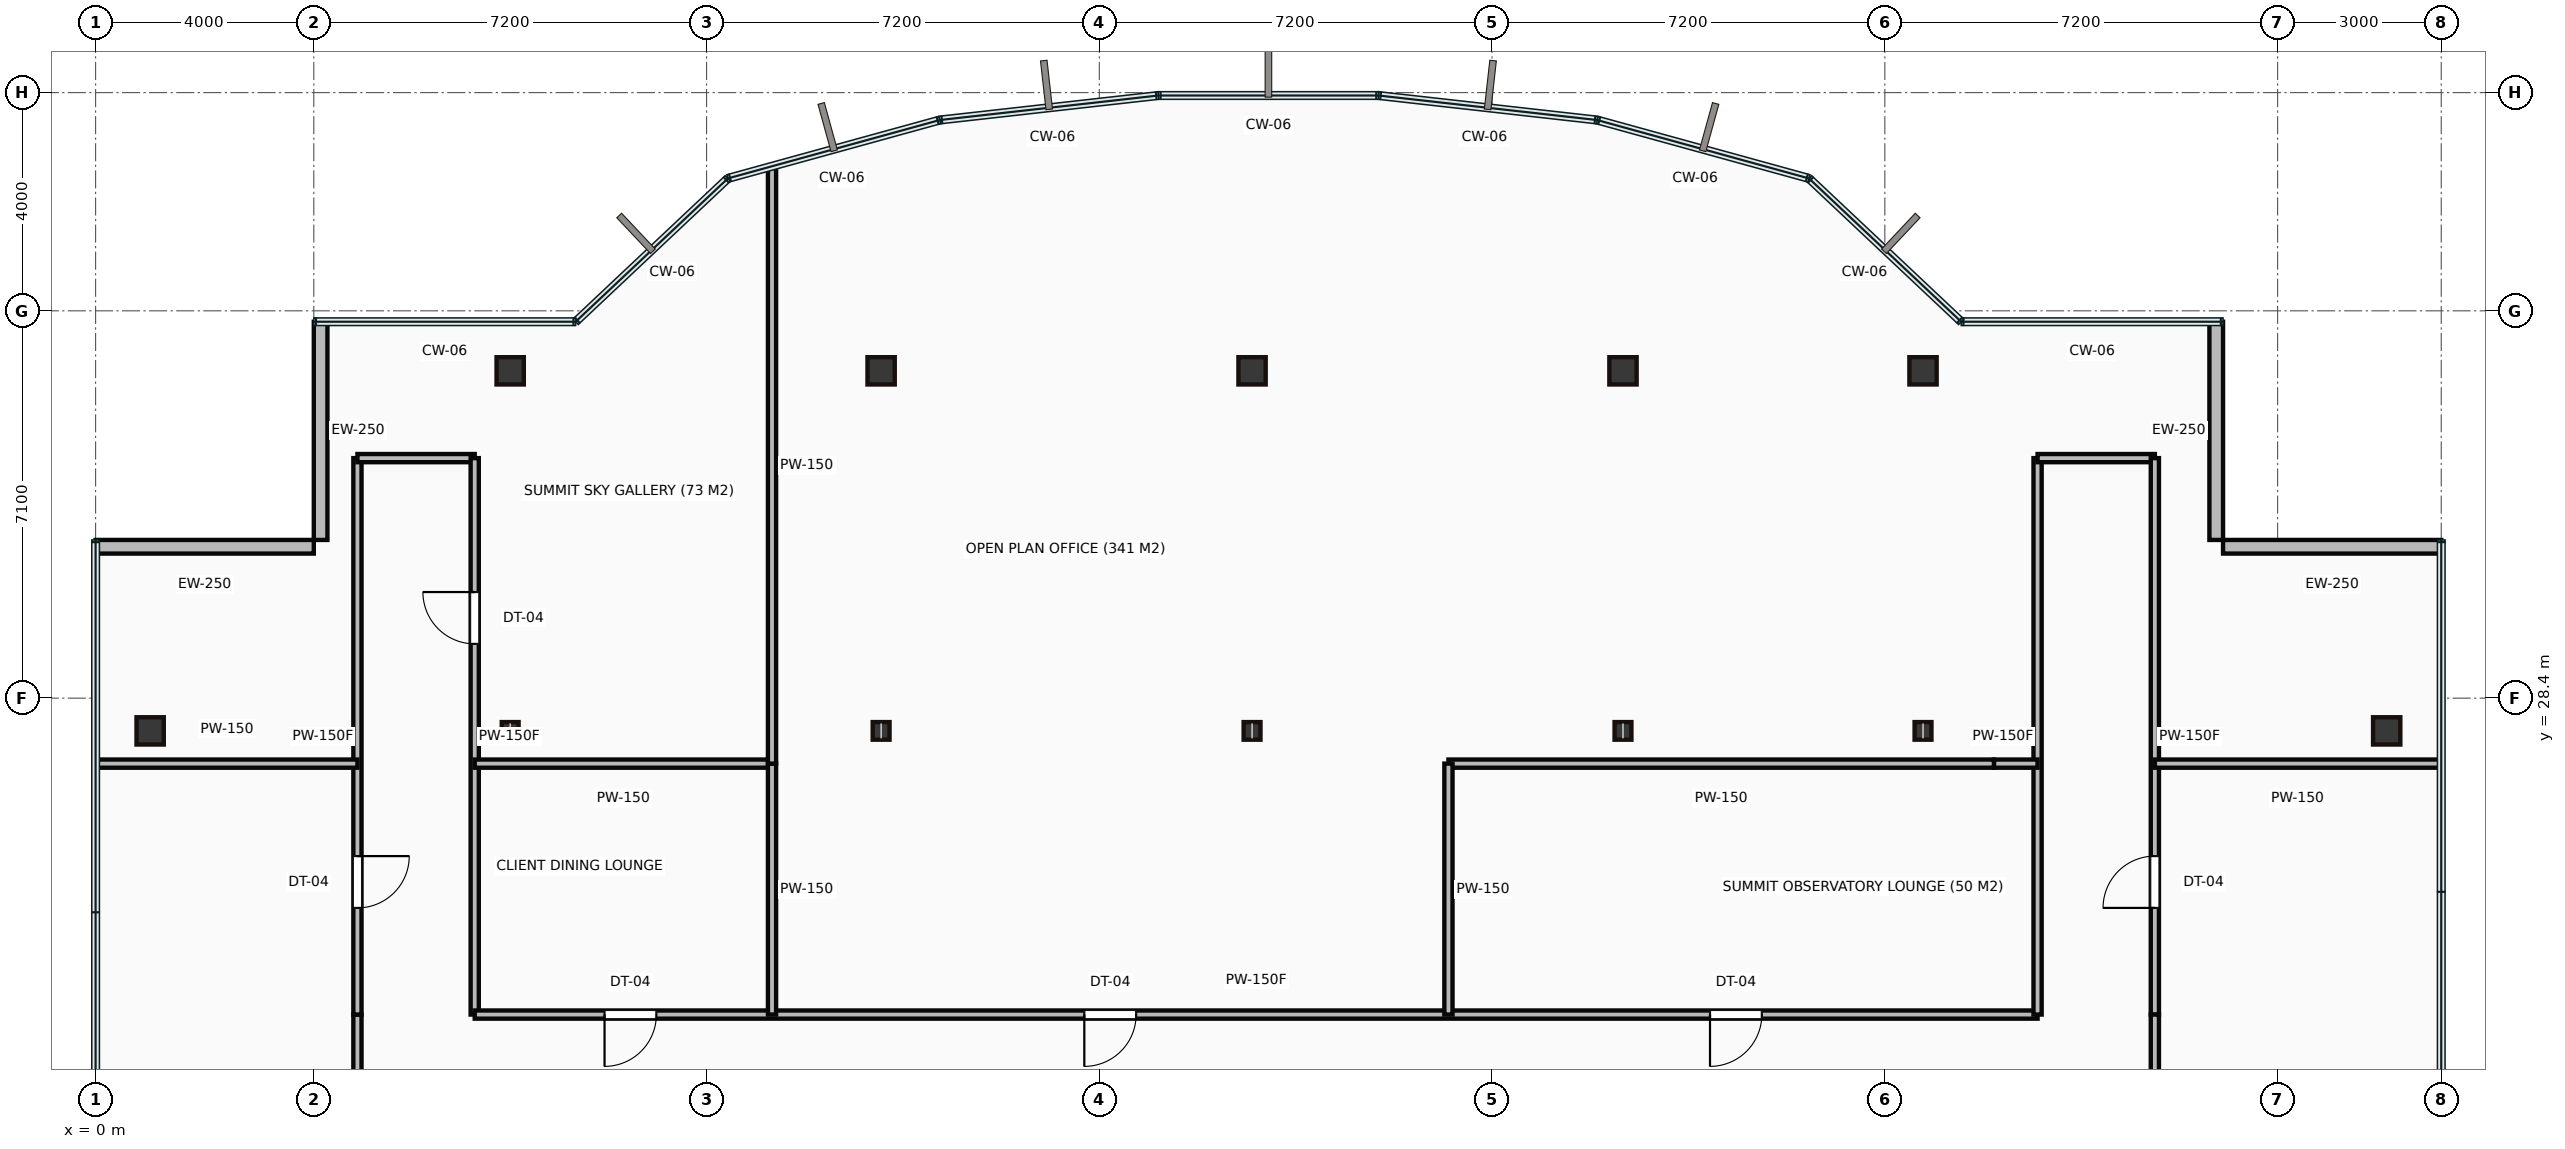
"""IFC4 building model, lengths in metres.
Left out: names, types, materials, properties, quantities, classifications, styles, units other than length and angle.
Written with IfcOpenShell. Run it as: python <this file> out.ifc"""

import sys

from ifc_helpers import new_model, si_unit, direction, frame, frame_2d, origin, origin_2d, place, context, subcontext, project, spatial, rectangle, hollow_rectangle, i_section, extrude, source, transform, mapped, element, fill, save


model = new_model("IFC4")
c1 = context("Model", 3, precision=1e-05, world=origin(), true_north=direction((0.0, 1.0)))
c2 = subcontext(c1, "Body", "Model", "MODEL_VIEW")
j1 = project(units=[si_unit("LENGTHUNIT", "METRE"), si_unit("PLANEANGLEUNIT", "RADIAN")], contexts=[c1])
p1 = place(None, origin())
s1 = spatial("IfcSite", under=j1, at=p1, CompositionType="ELEMENT")
p2 = place(p1, origin())
s2 = spatial("IfcBuilding", under=s1, at=p2, CompositionType="ELEMENT")
p3 = place(p2, frame((0.0, 0.0, 288.0)))
s3 = spatial("IfcBuildingStorey", under=s2, at=p3, CompositionType="ELEMENT", Elevation=288.0)
m1 = source(origin(), c2, "Body", "SweptSolid", [
    extrude(hollow_rectangle(XDim=0.5, YDim=0.5, WallThickness=0.022, at=origin_2d()), origin(), (0.0, 0.0, 1.0), 4.25),
])
p4 = place(p3, frame((1.0, 27.8, 0.0), z_axis=(0.0, 0.0, 1.0), x_axis=(1.0, 0.0, 0.0)))
e1 = element("IfcColumn", 1, at=p4, inside=s3, PredefinedType="COLUMN", context=c2, shape_type="MappedRepresentation", body=[
    mapped(m1, transform((0.0, 0.0, 0.0))),
])
m2 = source(origin(), c2, "Body", "SweptSolid", [
    extrude(i_section(OverallWidth=0.309, OverallDepth=0.323, WebThickness=0.014, FlangeThickness=0.023, at=origin_2d()), origin(), (0.0, 0.0, 1.0), 4.25),
])
p5 = place(p3, frame((7.6, 27.8, 0.0), z_axis=(0.0, 0.0, 1.0), x_axis=(1.0, 0.0, 0.0)))
e2 = element("IfcColumn", 2, at=p5, inside=s3, PredefinedType="COLUMN", context=c2, shape_type="MappedRepresentation", body=[
    mapped(m2, transform((0.0, 0.0, 0.0))),
])
p6 = place(p3, frame((7.6, 34.4, 0.0), z_axis=(0.0, 0.0, 1.0), x_axis=(1.0, 0.0, 0.0)))
e3 = element("IfcColumn", 3, at=p6, inside=s3, PredefinedType="COLUMN", context=c2, shape_type="MappedRepresentation", body=[
    mapped(m1, transform((0.0, 0.0, 0.0))),
])
p7 = place(p3, frame((14.4, 27.8, 0.0), z_axis=(0.0, 0.0, 1.0), x_axis=(1.0, 0.0, 0.0)))
e4 = element("IfcColumn", 4, at=p7, inside=s3, PredefinedType="COLUMN", context=c2, shape_type="MappedRepresentation", body=[
    mapped(m2, transform((0.0, 0.0, 0.0))),
])
p8 = place(p3, frame((14.4, 34.4, 0.0), z_axis=(0.0, 0.0, 1.0), x_axis=(1.0, 0.0, 0.0)))
e5 = element("IfcColumn", 5, at=p8, inside=s3, PredefinedType="COLUMN", context=c2, shape_type="MappedRepresentation", body=[
    mapped(m1, transform((0.0, 0.0, 0.0))),
])
p9 = place(p3, frame((21.2, 27.8, 0.0), z_axis=(0.0, 0.0, 1.0), x_axis=(1.0, 0.0, 0.0)))
e6 = element("IfcColumn", 6, at=p9, inside=s3, PredefinedType="COLUMN", context=c2, shape_type="MappedRepresentation", body=[
    mapped(m2, transform((0.0, 0.0, 0.0))),
])
p10 = place(p3, frame((21.2, 34.4, 0.0), z_axis=(0.0, 0.0, 1.0), x_axis=(1.0, 0.0, 0.0)))
e7 = element("IfcColumn", 7, at=p10, inside=s3, PredefinedType="COLUMN", context=c2, shape_type="MappedRepresentation", body=[
    mapped(m1, transform((0.0, 0.0, 0.0))),
])
p11 = place(p3, frame((28.0, 27.8, 0.0), z_axis=(0.0, 0.0, 1.0), x_axis=(1.0, 0.0, 0.0)))
e8 = element("IfcColumn", 8, at=p11, inside=s3, PredefinedType="COLUMN", context=c2, shape_type="MappedRepresentation", body=[
    mapped(m2, transform((0.0, 0.0, 0.0))),
])
p12 = place(p3, frame((28.0, 34.4, 0.0), z_axis=(0.0, 0.0, 1.0), x_axis=(1.0, 0.0, 0.0)))
e9 = element("IfcColumn", 9, at=p12, inside=s3, PredefinedType="COLUMN", context=c2, shape_type="MappedRepresentation", body=[
    mapped(m1, transform((0.0, 0.0, 0.0))),
])
p13 = place(p3, frame((33.5, 27.8, 0.0), z_axis=(0.0, 0.0, 1.0), x_axis=(1.0, 0.0, 0.0)))
e10 = element("IfcColumn", 10, at=p13, inside=s3, PredefinedType="COLUMN", context=c2, shape_type="MappedRepresentation", body=[
    mapped(m2, transform((0.0, 0.0, 0.0))),
])
for number, where, z_axis, x_axis in (
    (11, (33.5, 34.4, 0.0), (0.0, 0.0, 1.0), (1.0, 0.0, 0.0)),
    (12, (42.0, 27.8, 0.0), (0.0, 0.0, 1.0), (1.0, 0.0, 0.0)),
):
    element("IfcColumn", number, at=place(p3, frame(where, z_axis=z_axis, x_axis=x_axis)), inside=s3, PredefinedType="COLUMN", context=c2, shape_type="MappedRepresentation", body=[
        mapped(m1, transform((0.0, 0.0, 0.0))),
    ])
m3 = source(origin(), c2, "Body", "SweptSolid", [
    extrude(rectangle(XDim=4.0, YDim=0.25, at=frame_2d((2.0, 0.0))), origin(), (0.0, 0.0, 1.0), 3.85),
])
for number, where, z_axis, x_axis in (
    (13, (43.0, 31.175, 0.0), (0.0, 0.0, 1.0), (-1.0, 0.0, 0.0)),
    (14, (38.875, 31.3, 0.0), (0.0, 0.0, 1.0), (0.0, 1.0, 0.0)),
    (15, (4.125, 35.3, 0.0), (0.0, 0.0, 1.0), (0.0, -1.0, 0.0)),
    (16, (4.0, 31.175, 0.0), (0.0, 0.0, 1.0), (-1.0, 0.0, 0.0)),
):
    element("IfcWall", number, at=place(p3, frame(where, z_axis=z_axis, x_axis=x_axis)), inside=s3, PredefinedType="STANDARD", context=c2, shape_type="MappedRepresentation", body=[
        mapped(m3, transform((0.0, 0.0, 0.0))),
    ])
m4 = source(origin(), c2, "Body", "SweptSolid", [
    extrude(rectangle(XDim=2.0, YDim=0.15, at=frame_2d((1.0, 0.0))), origin(), (0.0, 0.0, 1.0), 3.85),
])
p14 = place(p3, frame((4.8, 20.6, 0.0), z_axis=(0.0, 0.0, 1.0), x_axis=(0.0, 1.0, 0.0)))
e17 = element("IfcWall", 17, at=p14, inside=s3, PredefinedType="PARTITIONING", context=c2, shape_type="MappedRepresentation", body=[
    mapped(m4, transform((0.0, 0.0, 0.0))),
])
m5 = source(origin(), c2, "Body", "SweptSolid", [
    extrude(rectangle(XDim=10.2, YDim=0.15, at=frame_2d((5.1, 0.0))), origin(), (0.0, 0.0, 1.0), 3.85),
])
p15 = place(p3, frame((4.8, 22.6, 0.0), z_axis=(0.0, 0.0, 1.0), x_axis=(0.0, 1.0, 0.0)))
e18 = element("IfcWall", 18, at=p15, inside=s3, PredefinedType="PARTITIONING", context=c2, shape_type="MappedRepresentation", body=[
    mapped(m5, transform((0.0, 0.0, 0.0))),
])
p16 = place(p15, frame((1.955, 0.0, 0.0)))
e19 = element("IfcOpeningElement", 19, at=p16, cuts=e18, PredefinedType="OPENING", context=c2, shape_type="SweptSolid", body=[
    extrude(rectangle(XDim=0.95, YDim=2.15, at=frame_2d((0.475, 1.075))), frame((0.0, 0.085, 0.0), z_axis=(0.0, -1.0, 0.0), x_axis=(1.0, 0.0, 0.0)), (0.0, 0.0, 1.0), 0.17),
])
m6 = source(origin(), c2, "Body", "SweptSolid", [
    extrude(rectangle(XDim=2.15, YDim=0.15, at=frame_2d((1.075, 0.0))), origin(), (0.0, 0.0, 1.0), 3.85),
])
p17 = place(p3, frame((4.8, 32.8, 0.0), z_axis=(0.0, 0.0, 1.0), x_axis=(1.0, 0.0, 0.0)))
e20 = element("IfcWall", 20, at=p17, inside=s3, PredefinedType="PARTITIONING", context=c2, shape_type="MappedRepresentation", body=[
    mapped(m6, transform((0.0, 0.0, 0.0))),
])
p18 = place(p3, frame((6.95, 32.8, 0.0), z_axis=(0.0, 0.0, 1.0), x_axis=(0.0, -1.0, 0.0)))
e21 = element("IfcWall", 21, at=p18, inside=s3, PredefinedType="PARTITIONING", context=c2, shape_type="MappedRepresentation", body=[
    mapped(m5, transform((0.0, 0.0, 0.0))),
])
p19 = place(p18, frame((2.455, 0.0, 0.0)))
e22 = element("IfcOpeningElement", 22, at=p19, cuts=e21, PredefinedType="OPENING", context=c2, shape_type="SweptSolid", body=[
    extrude(rectangle(XDim=0.95, YDim=2.15, at=frame_2d((0.475, 1.075))), frame((0.0, 0.085, 0.0), z_axis=(0.0, -1.0, 0.0), x_axis=(1.0, 0.0, 0.0)), (0.0, 0.0, 1.0), 0.17),
])
m7 = source(origin(), c2, "Body", "SweptSolid", [
    extrude(rectangle(XDim=28.65, YDim=0.15, at=frame_2d((14.325, 0.0))), origin(), (0.0, 0.0, 1.0), 3.85),
])
p20 = place(p3, frame((6.95, 22.6, 0.0), z_axis=(0.0, 0.0, 1.0), x_axis=(1.0, 0.0, 0.0)))
e23 = element("IfcWall", 23, at=p20, inside=s3, PredefinedType="PARTITIONING", context=c2, shape_type="MappedRepresentation", body=[
    mapped(m7, transform((0.0, 0.0, 0.0))),
])
p21 = place(p20, frame((2.38, 0.0, 0.0)))
e24 = element("IfcOpeningElement", 24, at=p21, cuts=e23, PredefinedType="OPENING", context=c2, shape_type="SweptSolid", body=[
    extrude(rectangle(XDim=0.95, YDim=2.15, at=frame_2d((0.475, 1.075))), frame((0.0, 0.085, 0.0), z_axis=(0.0, -1.0, 0.0), x_axis=(1.0, 0.0, 0.0)), (0.0, 0.0, 1.0), 0.17),
])
p22 = place(p20, frame((11.175, 0.0, 0.0)))
e25 = element("IfcOpeningElement", 25, at=p22, cuts=e23, PredefinedType="OPENING", context=c2, shape_type="SweptSolid", body=[
    extrude(rectangle(XDim=0.95, YDim=2.15, at=frame_2d((0.475, 1.075))), frame((0.0, 0.085, 0.0), z_axis=(0.0, -1.0, 0.0), x_axis=(1.0, 0.0, 0.0)), (0.0, 0.0, 1.0), 0.17),
])
p23 = place(p20, frame((22.645, 0.0, 0.0)))
e26 = element("IfcOpeningElement", 26, at=p23, cuts=e23, PredefinedType="OPENING", context=c2, shape_type="SweptSolid", body=[
    extrude(rectangle(XDim=0.95, YDim=2.15, at=frame_2d((0.475, 1.075))), frame((0.0, 0.085, 0.0), z_axis=(0.0, -1.0, 0.0), x_axis=(1.0, 0.0, 0.0)), (0.0, 0.0, 1.0), 0.17),
])
p24 = place(p3, frame((35.6, 22.6, 0.0), z_axis=(0.0, 0.0, 1.0), x_axis=(0.0, 1.0, 0.0)))
e27 = element("IfcWall", 27, at=p24, inside=s3, PredefinedType="PARTITIONING", context=c2, shape_type="MappedRepresentation", body=[
    mapped(m5, transform((0.0, 0.0, 0.0))),
])
p25 = place(p3, frame((35.6, 32.8, 0.0), z_axis=(0.0, 0.0, 1.0), x_axis=(1.0, 0.0, 0.0)))
e28 = element("IfcWall", 28, at=p25, inside=s3, PredefinedType="PARTITIONING", context=c2, shape_type="MappedRepresentation", body=[
    mapped(m6, transform((0.0, 0.0, 0.0))),
])
p26 = place(p3, frame((37.75, 32.8, 0.0), z_axis=(0.0, 0.0, 1.0), x_axis=(0.0, -1.0, 0.0)))
e29 = element("IfcWall", 29, at=p26, inside=s3, PredefinedType="PARTITIONING", context=c2, shape_type="MappedRepresentation", body=[
    mapped(m5, transform((0.0, 0.0, 0.0))),
])
p27 = place(p26, frame((7.295, 0.0, 0.0)))
e30 = element("IfcOpeningElement", 30, at=p27, cuts=e29, PredefinedType="OPENING", context=c2, shape_type="SweptSolid", body=[
    extrude(rectangle(XDim=0.95, YDim=2.15, at=frame_2d((0.475, 1.075))), frame((0.0, 0.085, 0.0), z_axis=(0.0, -1.0, 0.0), x_axis=(1.0, 0.0, 0.0)), (0.0, 0.0, 1.0), 0.17),
])
p28 = place(p3, frame((37.75, 22.6, 0.0), z_axis=(0.0, 0.0, 1.0), x_axis=(0.0, -1.0, 0.0)))
e31 = element("IfcWall", 31, at=p28, inside=s3, PredefinedType="PARTITIONING", context=c2, shape_type="MappedRepresentation", body=[
    mapped(m4, transform((0.0, 0.0, 0.0))),
])
m8 = source(origin(), c2, "Body", "SweptSolid", [
    extrude(rectangle(XDim=4.78, YDim=0.15, at=frame_2d((2.39, 0.0))), origin(), (0.0, 0.0, 1.0), 3.85),
])
p29 = place(p3, frame((0.02, 27.2, 0.0), z_axis=(0.0, 0.0, 1.0), x_axis=(1.0, 0.0, 0.0)))
e32 = element("IfcWall", 32, at=p29, inside=s3, PredefinedType="PARTITIONING", context=c2, shape_type="MappedRepresentation", body=[
    mapped(m8, transform((0.0, 0.0, 0.0))),
])
m9 = source(origin(), c2, "Body", "SweptSolid", [
    extrude(rectangle(XDim=5.45, YDim=0.15, at=frame_2d((2.725, 0.0))), origin(), (0.0, 0.0, 1.0), 3.85),
])
p30 = place(p3, frame((12.4, 27.2, 0.0), z_axis=(0.0, 0.0, 1.0), x_axis=(-1.0, 0.0, 0.0)))
e33 = element("IfcWall", 33, at=p30, inside=s3, PredefinedType="PARTITIONING", context=c2, shape_type="MappedRepresentation", body=[
    mapped(m9, transform((0.0, 0.0, 0.0))),
])
m10 = source(origin(), c2, "Body", "SweptSolid", [
    extrude(rectangle(XDim=4.6, YDim=0.15, at=frame_2d((2.3, 0.0))), origin(), (0.0, 0.0, 1.0), 3.85),
])
p31 = place(p3, frame((12.4, 27.2, 0.0), z_axis=(0.0, 0.0, 1.0), x_axis=(0.0, -1.0, 0.0)))
e34 = element("IfcWall", 34, at=p31, inside=s3, PredefinedType="PARTITIONING", context=c2, shape_type="MappedRepresentation", body=[
    mapped(m10, transform((0.0, 0.0, 0.0))),
])
m11 = source(origin(), c2, "Body", "SweptSolid", [
    extrude(rectangle(XDim=10.929, YDim=0.15, at=frame_2d((5.465, 0.0))), origin(), (0.0, 0.0, 1.0), 3.85),
])
p32 = place(p3, frame((12.4, 38.129, 0.0), z_axis=(0.0, 0.0, 1.0), x_axis=(0.0, -1.0, 0.0)))
e35 = element("IfcWall", 35, at=p32, inside=s3, PredefinedType="PARTITIONING", context=c2, shape_type="MappedRepresentation", body=[
    mapped(m11, transform((0.0, 0.0, 0.0))),
])
m12 = source(origin(), c2, "Body", "SweptSolid", [
    extrude(rectangle(XDim=0.8, YDim=0.15, at=frame_2d((0.4, 0.0))), origin(), (0.0, 0.0, 1.0), 3.85),
])
p33 = place(p3, frame((35.6, 27.2, 0.0), z_axis=(0.0, 0.0, 1.0), x_axis=(-1.0, 0.0, 0.0)))
e36 = element("IfcWall", 36, at=p33, inside=s3, PredefinedType="PARTITIONING", context=c2, shape_type="MappedRepresentation", body=[
    mapped(m12, transform((0.0, 0.0, 0.0))),
])
m13 = source(origin(), c2, "Body", "SweptSolid", [
    extrude(rectangle(XDim=10.0, YDim=0.15, at=frame_2d((5.0, 0.0))), origin(), (0.0, 0.0, 1.0), 3.85),
])
p34 = place(p3, frame((34.8, 27.2, 0.0), z_axis=(0.0, 0.0, 1.0), x_axis=(-1.0, 0.0, 0.0)))
e37 = element("IfcWall", 37, at=p34, inside=s3, PredefinedType="PARTITIONING", context=c2, shape_type="MappedRepresentation", body=[
    mapped(m13, transform((0.0, 0.0, 0.0))),
])
p35 = place(p3, frame((24.8, 27.2, 0.0), z_axis=(0.0, 0.0, 1.0), x_axis=(0.0, -1.0, 0.0)))
e38 = element("IfcWall", 38, at=p35, inside=s3, PredefinedType="PARTITIONING", context=c2, shape_type="MappedRepresentation", body=[
    mapped(m10, transform((0.0, 0.0, 0.0))),
])
m14 = source(origin(), c2, "Body", "SweptSolid", [
    extrude(rectangle(XDim=5.23, YDim=0.15, at=frame_2d((2.615, 0.0))), origin(), (0.0, 0.0, 1.0), 3.85),
])
p36 = place(p3, frame((42.98, 27.2, 0.0), z_axis=(0.0, 0.0, 1.0), x_axis=(-1.0, 0.0, 0.0)))
e39 = element("IfcWall", 39, at=p36, inside=s3, PredefinedType="PARTITIONING", context=c2, shape_type="MappedRepresentation", body=[
    mapped(m14, transform((0.0, 0.0, 0.0))),
])
m15 = source(origin(), c2, "Body", "SweptSolid", [
    extrude(rectangle(XDim=0.95, YDim=2.15, at=frame_2d((0.475, 1.075))), frame((0.0, 0.025, 0.0), z_axis=(0.0, -1.0, 0.0), x_axis=(1.0, 0.0, 0.0)), (0.0, 0.0, 1.0), 0.05),
])
p37 = place(p16, origin())
e40 = element("IfcDoor", 40, at=p37, inside=s3, OperationType="SINGLE_SWING_RIGHT", PredefinedType="DOOR", context=c2, shape_type="MappedRepresentation", body=[
    mapped(m15, transform((0.0, 0.0, 0.0))),
])
fill(e19, e40)
p38 = place(p19, origin())
e41 = element("IfcDoor", 41, at=p38, inside=s3, OperationType="SINGLE_SWING_LEFT", PredefinedType="DOOR", context=c2, shape_type="MappedRepresentation", body=[
    mapped(m15, transform((0.0, 0.0, 0.0))),
])
fill(e22, e41)
p39 = place(p21, origin())
e42 = element("IfcDoor", 42, at=p39, inside=s3, OperationType="SINGLE_SWING_LEFT", PredefinedType="DOOR", context=c2, shape_type="MappedRepresentation", body=[
    mapped(m15, transform((0.0, 0.0, 0.0))),
])
fill(e24, e42)
p40 = place(p22, origin())
e43 = element("IfcDoor", 43, at=p40, inside=s3, OperationType="SINGLE_SWING_LEFT", PredefinedType="DOOR", context=c2, shape_type="MappedRepresentation", body=[
    mapped(m15, transform((0.0, 0.0, 0.0))),
])
fill(e25, e43)
p41 = place(p23, origin())
e44 = element("IfcDoor", 44, at=p41, inside=s3, OperationType="SINGLE_SWING_LEFT", PredefinedType="DOOR", context=c2, shape_type="MappedRepresentation", body=[
    mapped(m15, transform((0.0, 0.0, 0.0))),
])
fill(e26, e44)
p42 = place(p27, origin())
e45 = element("IfcDoor", 45, at=p42, inside=s3, OperationType="SINGLE_SWING_RIGHT", PredefinedType="DOOR", context=c2, shape_type="MappedRepresentation", body=[
    mapped(m15, transform((0.0, 0.0, 0.0))),
])
fill(e30, e45)
save(model, sys.argv[1])
